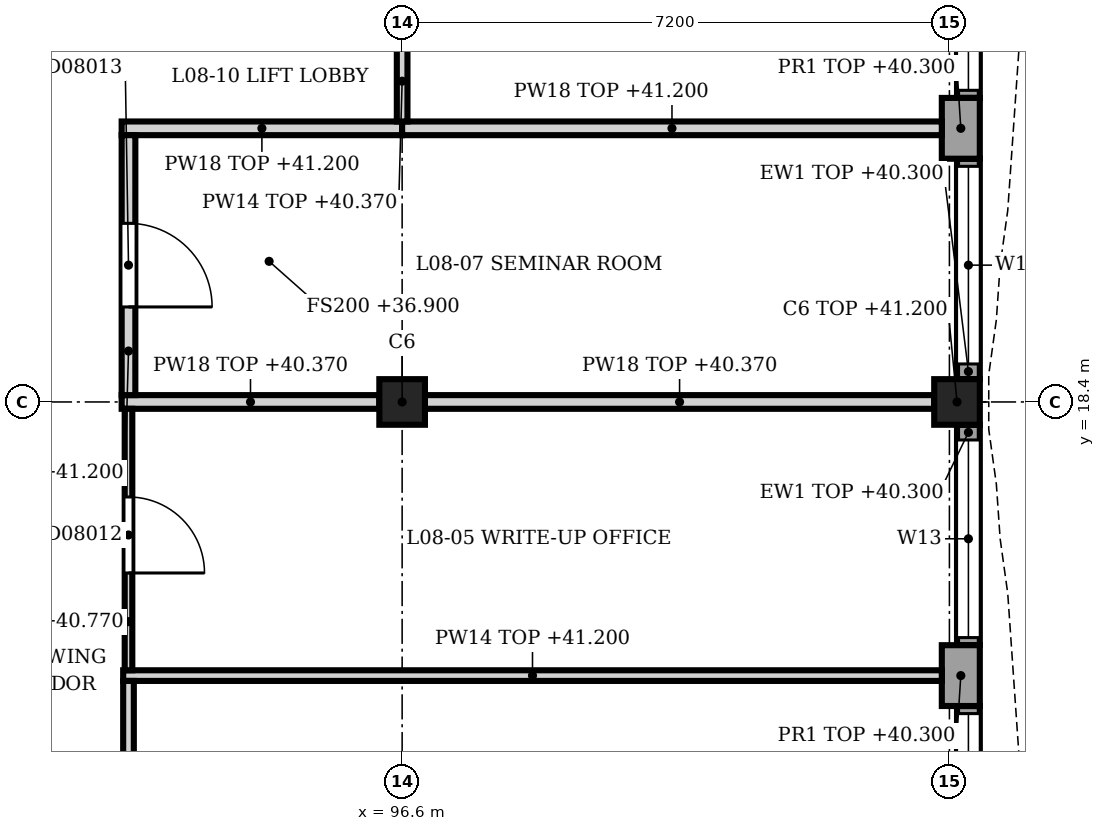
"""IFC4 building model, lengths in metres.
Left out: names, types, materials, properties, quantities, classifications, styles, units other than length and angle.
Written with IfcOpenShell. Run it as: python <this file> out.ifc"""

import sys

from ifc_helpers import new_model, si_unit, direction, frame, frame_2d, origin, origin_2d, place, context, subcontext, project, spatial, rectangle, extrude, element, fill, save


model = new_model("IFC4")
c1 = context("Model", 3, precision=1e-05, world=origin(), true_north=direction((0.0, 1.0)))
c2 = subcontext(c1, "Body", "Model", "MODEL_VIEW")
j1 = project(units=[si_unit("LENGTHUNIT", "METRE"), si_unit("PLANEANGLEUNIT", "RADIAN")], contexts=[c1])
p1 = place(None, origin())
s1 = spatial("IfcSite", under=j1, at=p1, CompositionType="ELEMENT")
p2 = place(p1, origin())
s2 = spatial("IfcBuilding", under=s1, at=p2, CompositionType="ELEMENT")
p3 = place(p2, frame((0.0, 0.0, 36.9)))
s3 = spatial("IfcBuildingStorey", under=s2, at=p3, CompositionType="ELEMENT", Elevation=36.9)
p4 = place(p3, frame((96.6, 18.4, 0.0), z_axis=(0.0, 0.0, 1.0), x_axis=(1.0, 0.0, 0.0)))
e1 = element("IfcColumn", 1, at=p4, inside=s3, PredefinedType="COLUMN", context=c2, shape_type="SweptSolid", body=[
    extrude(rectangle(XDim=0.6, YDim=0.6, at=origin_2d()), origin(), (0.0, 0.0, 1.0), 4.5),
])
p5 = place(p3, frame((103.9, 18.4, 0.0), z_axis=(0.0, 0.0, 1.0), x_axis=(1.0, 0.0, 0.0)))
e2 = element("IfcColumn", 2, at=p5, inside=s3, PredefinedType="COLUMN", context=c2, shape_type="SweptSolid", body=[
    extrude(rectangle(XDim=0.6, YDim=0.6, at=origin_2d()), origin(), (0.0, 0.0, 1.0), 4.3),
])
p6 = place(p3, frame((103.95, 22.4, 0.0), z_axis=(0.0, 0.0, 1.0), x_axis=(0.0, -1.0, 0.0)))
e3 = element("IfcWall", 3, at=p6, inside=s3, PredefinedType="SOLIDWALL", context=c2, shape_type="SweptSolid", body=[
    extrude(rectangle(XDim=0.8, YDim=0.5, at=frame_2d((0.4, 0.0))), origin(), (0.0, 0.0, 1.0), 3.4),
])
p7 = place(p3, frame((103.95, 15.2, 0.0), z_axis=(0.0, 0.0, 1.0), x_axis=(0.0, -1.0, 0.0)))
e4 = element("IfcWall", 4, at=p7, inside=s3, PredefinedType="SOLIDWALL", context=c2, shape_type="SweptSolid", body=[
    extrude(rectangle(XDim=0.8, YDim=0.5, at=frame_2d((0.4, 0.0))), origin(), (0.0, 0.0, 1.0), 3.4),
])
p8 = place(p3, frame((104.05, 25.3, 0.0), z_axis=(0.0, 0.0, 1.0), x_axis=(0.0, -1.0, 0.0)))
e5 = element("IfcWall", 5, at=p8, inside=s3, PredefinedType="SOLIDWALL", context=c2, shape_type="SweptSolid", body=[
    extrude(rectangle(XDim=2.9, YDim=0.3, at=frame_2d((1.45, 0.0))), origin(), (0.0, 0.0, 1.0), 3.4),
])
p9 = place(p8, frame((0.2, 0.0, 0.9)))
e6 = element("IfcOpeningElement", 6, at=p9, cuts=e5, PredefinedType="OPENING", context=c2, shape_type="SweptSolid", body=[
    extrude(rectangle(XDim=2.6, YDim=2.2, at=frame_2d((1.3, 1.1))), frame((0.0, 0.16, 0.0), z_axis=(0.0, -1.0, 0.0), x_axis=(1.0, 0.0, 0.0)), (0.0, 0.0, 1.0), 0.32),
])
p10 = place(p3, frame((104.05, 21.6, 0.0), z_axis=(0.0, 0.0, 1.0), x_axis=(0.0, -1.0, 0.0)))
e7 = element("IfcWall", 7, at=p10, inside=s3, PredefinedType="SOLIDWALL", context=c2, shape_type="SweptSolid", body=[
    extrude(rectangle(XDim=2.9, YDim=0.3, at=frame_2d((1.45, 0.0))), origin(), (0.0, 0.0, 1.0), 3.4),
])
p11 = place(p10, frame((0.1, 0.0, 0.9)))
e8 = element("IfcOpeningElement", 8, at=p11, cuts=e7, PredefinedType="OPENING", context=c2, shape_type="SweptSolid", body=[
    extrude(rectangle(XDim=2.6, YDim=2.2, at=frame_2d((1.3, 1.1))), frame((0.0, 0.16, 0.0), z_axis=(0.0, -1.0, 0.0), x_axis=(1.0, 0.0, 0.0)), (0.0, 0.0, 1.0), 0.32),
])
p12 = place(p3, frame((104.05, 18.1, 0.0), z_axis=(0.0, 0.0, 1.0), x_axis=(0.0, -1.0, 0.0)))
e9 = element("IfcWall", 9, at=p12, inside=s3, PredefinedType="SOLIDWALL", context=c2, shape_type="SweptSolid", body=[
    extrude(rectangle(XDim=2.9, YDim=0.3, at=frame_2d((1.45, 0.0))), origin(), (0.0, 0.0, 1.0), 3.4),
])
p13 = place(p12, frame((0.2, 0.0, 0.9)))
e10 = element("IfcOpeningElement", 10, at=p13, cuts=e9, PredefinedType="OPENING", context=c2, shape_type="SweptSolid", body=[
    extrude(rectangle(XDim=2.6, YDim=2.2, at=frame_2d((1.3, 1.1))), frame((0.0, 0.16, 0.0), z_axis=(0.0, -1.0, 0.0), x_axis=(1.0, 0.0, 0.0)), (0.0, 0.0, 1.0), 0.32),
])
p14 = place(p3, frame((104.05, 14.4, 0.0), z_axis=(0.0, 0.0, 1.0), x_axis=(0.0, -1.0, 0.0)))
e11 = element("IfcWall", 11, at=p14, inside=s3, PredefinedType="SOLIDWALL", context=c2, shape_type="SweptSolid", body=[
    extrude(rectangle(XDim=2.9, YDim=0.3, at=frame_2d((1.45, 0.0))), origin(), (0.0, 0.0, 1.0), 3.4),
])
p15 = place(p14, frame((0.1, 0.0, 0.9)))
e12 = element("IfcOpeningElement", 12, at=p15, cuts=e11, PredefinedType="OPENING", context=c2, shape_type="SweptSolid", body=[
    extrude(rectangle(XDim=2.6, YDim=2.2, at=frame_2d((1.3, 1.1))), frame((0.0, 0.16, 0.0), z_axis=(0.0, -1.0, 0.0), x_axis=(1.0, 0.0, 0.0)), (0.0, 0.0, 1.0), 0.32),
])
p16 = place(p3, frame((92.93, 14.8, 0.0), z_axis=(0.0, 0.0, 1.0), x_axis=(1.0, 0.0, 0.0)))
e13 = element("IfcWall", 13, at=p16, inside=s3, PredefinedType="PARTITIONING", context=c2, shape_type="SweptSolid", body=[
    extrude(rectangle(XDim=10.77, YDim=0.14, at=frame_2d((5.385, 0.0))), origin(), (0.0, 0.0, 1.0), 4.3),
])
p17 = place(p3, frame((92.91, 18.4, 0.0), z_axis=(0.0, 0.0, 1.0), x_axis=(1.0, 0.0, 0.0)))
e14 = element("IfcWall", 14, at=p17, inside=s3, PredefinedType="PARTITIONING", context=c2, shape_type="SweptSolid", body=[
    extrude(rectangle(XDim=3.39, YDim=0.18, at=frame_2d((1.695, 0.0))), origin(), (0.0, 0.0, 1.0), 3.47),
])
p18 = place(p3, frame((96.9, 18.4, 0.0), z_axis=(0.0, 0.0, 1.0), x_axis=(1.0, 0.0, 0.0)))
e15 = element("IfcWall", 15, at=p18, inside=s3, PredefinedType="PARTITIONING", context=c2, shape_type="SweptSolid", body=[
    extrude(rectangle(XDim=6.7, YDim=0.18, at=frame_2d((3.35, 0.0))), origin(), (0.0, 0.0, 1.0), 3.47),
])
p19 = place(p3, frame((92.91, 22.0, 0.0), z_axis=(0.0, 0.0, 1.0), x_axis=(1.0, 0.0, 0.0)))
e16 = element("IfcWall", 16, at=p19, inside=s3, PredefinedType="PARTITIONING", context=c2, shape_type="SweptSolid", body=[
    extrude(rectangle(XDim=3.69, YDim=0.18, at=frame_2d((1.845, 0.0))), origin(), (0.0, 0.0, 1.0), 4.3),
])
p20 = place(p3, frame((96.6, 22.0, 0.0), z_axis=(0.0, 0.0, 1.0), x_axis=(1.0, 0.0, 0.0)))
e17 = element("IfcWall", 17, at=p20, inside=s3, PredefinedType="PARTITIONING", context=c2, shape_type="SweptSolid", body=[
    extrude(rectangle(XDim=7.1, YDim=0.18, at=frame_2d((3.55, 0.0))), origin(), (0.0, 0.0, 1.0), 4.3),
])
p21 = place(p3, frame((93.0, 14.73, 0.0), z_axis=(0.0, 0.0, 1.0), x_axis=(0.0, -1.0, 0.0)))
e18 = element("IfcWall", 18, at=p21, inside=s3, PredefinedType="PARTITIONING", context=c2, shape_type="SweptSolid", body=[
    extrude(rectangle(XDim=7.06, YDim=0.14, at=frame_2d((3.53, 0.0))), origin(), (0.0, 0.0, 1.0), 3.87),
])
p22 = place(p21, frame((2.98, 0.0, 0.0)))
e19 = element("IfcOpeningElement", 19, at=p22, cuts=e18, PredefinedType="OPENING", context=c2, shape_type="SweptSolid", body=[
    extrude(rectangle(XDim=1.2, YDim=2.1, at=frame_2d((0.6, 1.05))), frame((0.0, 0.08, 0.0), z_axis=(0.0, -1.0, 0.0), x_axis=(1.0, 0.0, 0.0)), (0.0, 0.0, 1.0), 0.16),
])
p23 = place(p3, frame((93.0, 18.31, 0.0), z_axis=(0.0, 0.0, 1.0), x_axis=(0.0, -1.0, 0.0)))
e20 = element("IfcWall", 20, at=p23, inside=s3, PredefinedType="PARTITIONING", context=c2, shape_type="SweptSolid", body=[
    extrude(rectangle(XDim=3.44, YDim=0.1, at=frame_2d((1.72, 0.0))), origin(), (0.0, 0.0, 1.0), 3.87),
])
p24 = place(p23, frame((1.16, 0.0, 0.0)))
e21 = element("IfcOpeningElement", 21, at=p24, cuts=e20, PredefinedType="OPENING", context=c2, shape_type="SweptSolid", body=[
    extrude(rectangle(XDim=1.0, YDim=2.1, at=frame_2d((0.5, 1.05))), frame((0.0, 0.06, 0.0), z_axis=(0.0, -1.0, 0.0), x_axis=(1.0, 0.0, 0.0)), (0.0, 0.0, 1.0), 0.12),
])
p25 = place(p3, frame((93.0, 21.91, 0.0), z_axis=(0.0, 0.0, 1.0), x_axis=(0.0, -1.0, 0.0)))
e22 = element("IfcWall", 22, at=p25, inside=s3, PredefinedType="PARTITIONING", context=c2, shape_type="SweptSolid", body=[
    extrude(rectangle(XDim=3.42, YDim=0.18, at=frame_2d((1.71, 0.0))), origin(), (0.0, 0.0, 1.0), 4.3),
])
p26 = place(p25, frame((1.16, 0.0, 0.0)))
e23 = element("IfcOpeningElement", 23, at=p26, cuts=e22, PredefinedType="OPENING", context=c2, shape_type="SweptSolid", body=[
    extrude(rectangle(XDim=1.1, YDim=2.3, at=frame_2d((0.55, 1.15))), frame((0.0, 0.1, 0.0), z_axis=(0.0, -1.0, 0.0), x_axis=(1.0, 0.0, 0.0)), (0.0, 0.0, 1.0), 0.2),
])
p27 = place(p3, frame((96.6, 25.3, 0.0), z_axis=(0.0, 0.0, 1.0), x_axis=(0.0, -1.0, 0.0)))
e24 = element("IfcWall", 24, at=p27, inside=s3, PredefinedType="PARTITIONING", context=c2, shape_type="SweptSolid", body=[
    extrude(rectangle(XDim=3.21, YDim=0.14, at=frame_2d((1.605, 0.0))), origin(), (0.0, 0.0, 1.0), 3.47),
])
p28 = place(p27, frame((0.85, 0.0, 0.0)))
e25 = element("IfcOpeningElement", 25, at=p28, cuts=e24, PredefinedType="OPENING", context=c2, shape_type="SweptSolid", body=[
    extrude(rectangle(XDim=1.3, YDim=2.1, at=frame_2d((0.65, 1.05))), frame((0.0, 0.08, 0.0), z_axis=(0.0, -1.0, 0.0), x_axis=(1.0, 0.0, 0.0)), (0.0, 0.0, 1.0), 0.16),
])
p29 = place(p9, origin())
e26 = element("IfcWindow", 26, at=p29, inside=s3, PartitioningType="SINGLE_PANEL", PredefinedType="WINDOW", context=c2, shape_type="SweptSolid", body=[
    extrude(rectangle(XDim=2.6, YDim=2.2, at=frame_2d((1.3, 1.1))), frame((0.0, 0.03, 0.0), z_axis=(0.0, -1.0, 0.0), x_axis=(1.0, 0.0, 0.0)), (0.0, 0.0, 1.0), 0.06),
])
fill(e6, e26)
p30 = place(p11, origin())
e27 = element("IfcWindow", 27, at=p30, inside=s3, PartitioningType="SINGLE_PANEL", PredefinedType="WINDOW", context=c2, shape_type="SweptSolid", body=[
    extrude(rectangle(XDim=2.6, YDim=2.2, at=frame_2d((1.3, 1.1))), frame((0.0, 0.03, 0.0), z_axis=(0.0, -1.0, 0.0), x_axis=(1.0, 0.0, 0.0)), (0.0, 0.0, 1.0), 0.06),
])
fill(e8, e27)
p31 = place(p13, origin())
e28 = element("IfcWindow", 28, at=p31, inside=s3, PartitioningType="SINGLE_PANEL", PredefinedType="WINDOW", context=c2, shape_type="SweptSolid", body=[
    extrude(rectangle(XDim=2.6, YDim=2.2, at=frame_2d((1.3, 1.1))), frame((0.0, 0.03, 0.0), z_axis=(0.0, -1.0, 0.0), x_axis=(1.0, 0.0, 0.0)), (0.0, 0.0, 1.0), 0.06),
])
fill(e10, e28)
p32 = place(p15, origin())
e29 = element("IfcWindow", 29, at=p32, inside=s3, PartitioningType="SINGLE_PANEL", PredefinedType="WINDOW", context=c2, shape_type="SweptSolid", body=[
    extrude(rectangle(XDim=2.6, YDim=2.2, at=frame_2d((1.3, 1.1))), frame((0.0, 0.03, 0.0), z_axis=(0.0, -1.0, 0.0), x_axis=(1.0, 0.0, 0.0)), (0.0, 0.0, 1.0), 0.06),
])
fill(e12, e29)
p33 = place(p24, origin())
e30 = element("IfcDoor", 30, at=p33, inside=s3, OperationType="SINGLE_SWING_LEFT", PredefinedType="DOOR", context=c2, shape_type="SweptSolid", body=[
    extrude(rectangle(XDim=1.0, YDim=2.1, at=frame_2d((0.5, 1.05))), frame((0.0, 0.025, 0.0), z_axis=(0.0, -1.0, 0.0), x_axis=(1.0, 0.0, 0.0)), (0.0, 0.0, 1.0), 0.05),
])
fill(e21, e30)
p34 = place(p26, origin())
e31 = element("IfcDoor", 31, at=p34, inside=s3, OperationType="SINGLE_SWING_RIGHT", PredefinedType="DOOR", context=c2, shape_type="SweptSolid", body=[
    extrude(rectangle(XDim=1.1, YDim=2.3, at=frame_2d((0.55, 1.15))), frame((0.0, 0.025, 0.0), z_axis=(0.0, -1.0, 0.0), x_axis=(1.0, 0.0, 0.0)), (0.0, 0.0, 1.0), 0.05),
])
fill(e23, e31)
save(model, sys.argv[1])
